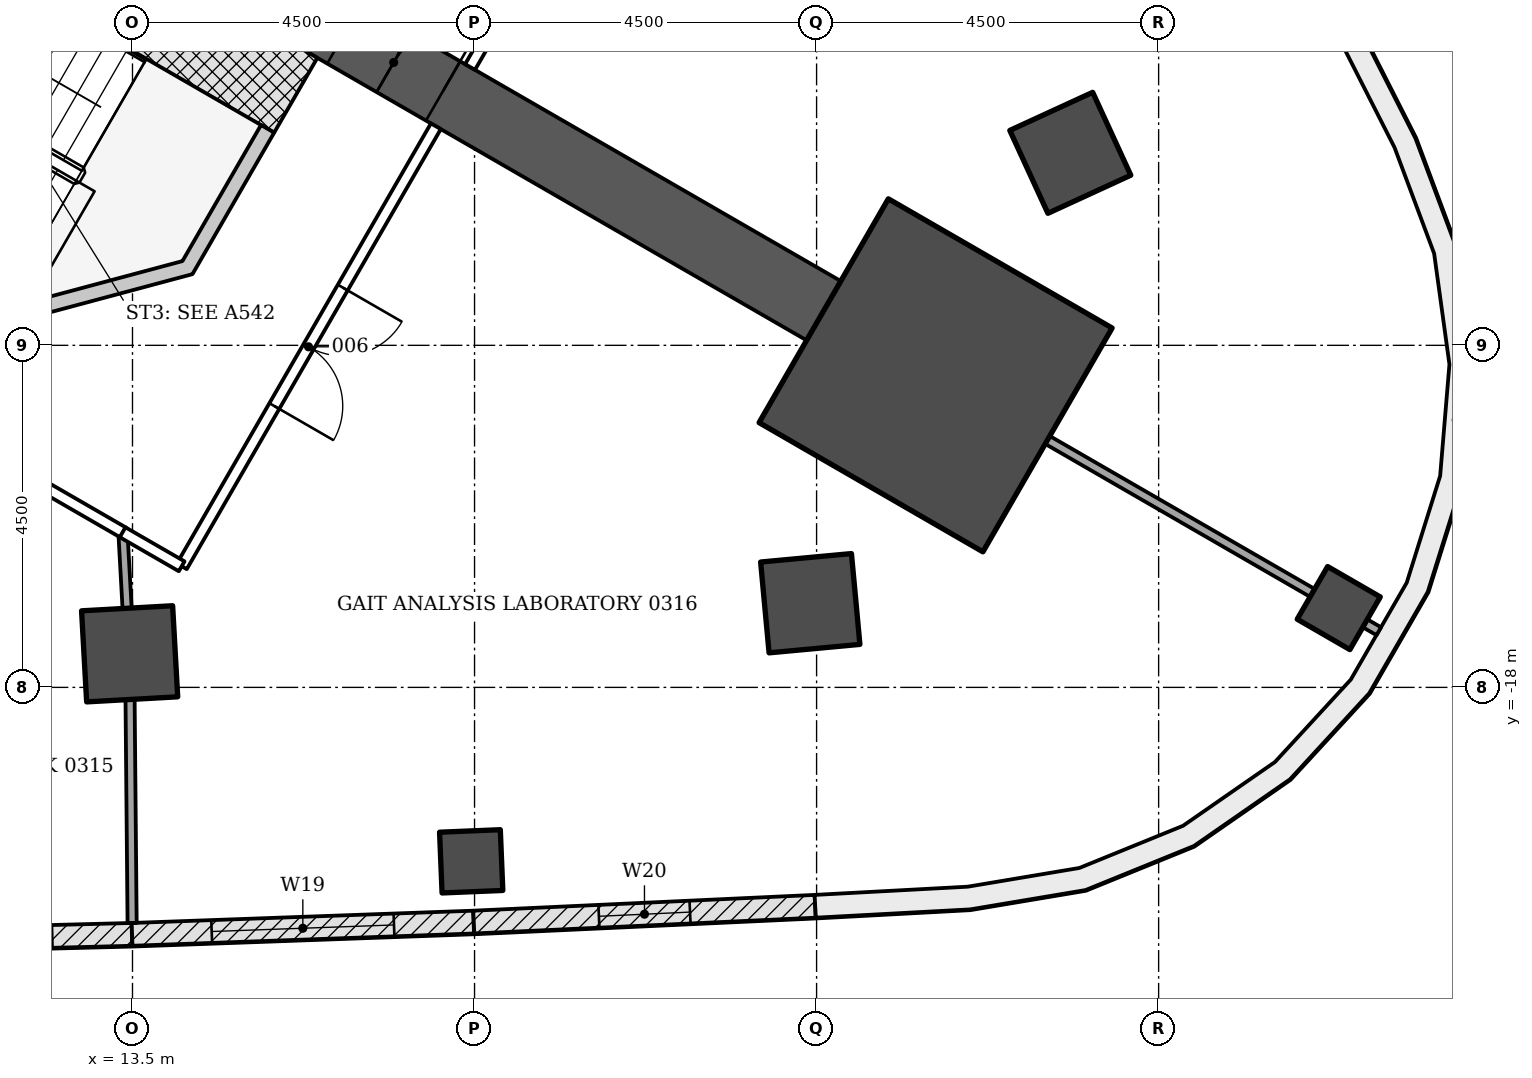
"""IFC4 building model, lengths in metres.
Left out: names, types, materials, properties, quantities, classifications, styles, units other than length and angle.
Written with IfcOpenShell. Run it as: python <this file> out.ifc"""

import sys

from ifc_helpers import new_model, si_unit, direction, frame, frame_2d, origin, origin_2d, place, context, subcontext, project, spatial, polyline, rectangle, outline, extrude, element, fill, save


model = new_model("IFC4")
c1 = context("Model", 3, precision=1e-05, world=origin(), true_north=direction((0.0, 1.0)))
c2 = subcontext(c1, "Body", "Model", "MODEL_VIEW")
j1 = project(units=[si_unit("LENGTHUNIT", "METRE"), si_unit("PLANEANGLEUNIT", "RADIAN")], contexts=[c1])
p1 = place(None, origin())
s1 = spatial("IfcSite", under=j1, at=p1, CompositionType="ELEMENT")
p2 = place(p1, origin())
s2 = spatial("IfcBuilding", under=s1, at=p2, CompositionType="ELEMENT")
p3 = place(p2, frame((0.0, 0.0, 15.0)))
s3 = spatial("IfcBuildingStorey", under=s2, at=p3, CompositionType="ELEMENT", Elevation=15.0)
for number, where, z_axis, x_axis in (
    (1, (13.462, -17.558, -0.25), (0.0, 0.0, 1.0), (0.056, -0.998, 0.0)),
    (2, (22.417, -16.893, -0.25), (0.0, 0.0, 1.0), (0.093, -0.996, 0.0)),
    (3, (25.838, -10.967, -0.25), (0.0, 0.0, 1.0), (0.909, 0.418, 0.0)),
):
    element("IfcColumn", number, at=place(p3, frame(where, z_axis=z_axis, x_axis=x_axis)), inside=s3, PredefinedType="COLUMN", context=c2, shape_type="SweptSolid", body=[
        extrude(rectangle(XDim=1.2, YDim=1.2, at=origin_2d()), origin(), (0.0, 0.0, 1.0), 4.5),
    ])
for number, where, z_axis, x_axis in (
    (4, (17.956, -20.288, -0.25), (0.0, 0.0, 1.0), (0.041, -0.999, 0.0)),
    (5, (29.37, -16.957, -0.25), (0.0, 0.0, 1.0), (0.866, -0.5, 0.0)),
):
    element("IfcColumn", number, at=place(p3, frame(where, z_axis=z_axis, x_axis=x_axis)), inside=s3, PredefinedType="COLUMN", context=c2, shape_type="SweptSolid", body=[
        extrude(rectangle(XDim=0.8, YDim=0.8, at=origin_2d()), origin(), (0.0, 0.0, 1.0), 4.5),
    ])
p4 = place(p3, frame((9.922, -5.728, -0.25), z_axis=(0.0, 0.0, 1.0), x_axis=(0.866028046028, -0.499995423472, 0.0)))
e6 = element("IfcWall", 6, at=p4, inside=s3, PredefinedType="SHEAR", context=c2, shape_type="SweptSolid", body=[
    extrude(rectangle(XDim=14.633, YDim=0.9, at=frame_2d((7.316, 0.0))), origin(), (0.0, 0.0, 1.0), 4.5),
])
p5 = place(p4, frame((7.35, 0.0, 0.25)))
e7 = element("IfcOpeningElement", 7, at=p5, cuts=e6, PredefinedType="OPENING", context=c2, shape_type="SweptSolid", body=[
    extrude(rectangle(XDim=1.5, YDim=2.1, at=frame_2d((0.75, 1.05))), frame((0.0, 0.46, 0.0), z_axis=(0.0, -1.0, 0.0), x_axis=(1.0, 0.0, 0.0)), (0.0, 0.0, 1.0), 0.92),
])
p6 = place(p3, frame((24.066, -13.895, -0.25), z_axis=(0.0, 0.0, 1.0), x_axis=(0.866025403784, -0.5, 0.0)))
e8 = element("IfcColumn", 8, at=p6, inside=s3, PredefinedType="COLUMN", context=c2, shape_type="SweptSolid", body=[
    extrude(rectangle(XDim=3.4, YDim=3.4, at=origin_2d()), origin(), (0.0, 0.0, 1.0), 4.5),
])
p7 = place(p3, frame((13.492, -21.25, 0.0), z_axis=(0.0, 0.0, 1.0), x_axis=(-0.999671466587, -0.025631209312, 0.0)))
e9 = element("IfcWall", 9, at=p7, inside=s3, PredefinedType="NOTDEFINED", context=c2, shape_type="SweptSolid", body=[
    extrude(rectangle(XDim=4.496, YDim=0.3, at=frame_2d((2.248, 0.0))), origin(), (0.0, 0.0, 1.0), 4.25),
])
p8 = place(p7, frame((1.048, 0.0, 0.9)))
e10 = element("IfcOpeningElement", 10, at=p8, cuts=e9, PredefinedType="OPENING", context=c2, shape_type="SweptSolid", body=[
    extrude(rectangle(XDim=2.4, YDim=2.4, at=frame_2d((1.2, 1.2))), frame((0.0, 0.16, 0.0), z_axis=(0.0, -1.0, 0.0), x_axis=(1.0, 0.0, 0.0)), (0.0, 0.0, 1.0), 0.32),
])
p9 = place(p3, frame((17.988, -21.088, 0.0), z_axis=(0.0, 0.0, 1.0), x_axis=(-0.999355640029, -0.035892962294, 0.0)))
e11 = element("IfcWall", 11, at=p9, inside=s3, PredefinedType="NOTDEFINED", context=c2, shape_type="SweptSolid", body=[
    extrude(rectangle(XDim=4.496, YDim=0.3, at=frame_2d((2.248, 0.0))), origin(), (0.0, 0.0, 1.0), 4.25),
])
p10 = place(p9, frame((1.048, 0.0, 0.9)))
e12 = element("IfcOpeningElement", 12, at=p10, cuts=e11, PredefinedType="OPENING", context=c2, shape_type="SweptSolid", body=[
    extrude(rectangle(XDim=2.4, YDim=2.4, at=frame_2d((1.2, 1.2))), frame((0.0, 0.16, 0.0), z_axis=(0.0, -1.0, 0.0), x_axis=(1.0, 0.0, 0.0)), (0.0, 0.0, 1.0), 0.32),
])
p11 = place(p3, frame((22.481, -20.88, 0.0), z_axis=(0.0, 0.0, 1.0), x_axis=(-0.998931717866, -0.046210637742, 0.0)))
e13 = element("IfcWall", 13, at=p11, inside=s3, PredefinedType="NOTDEFINED", context=c2, shape_type="SweptSolid", body=[
    extrude(rectangle(XDim=4.496, YDim=0.3, at=frame_2d((2.248, 0.0))), origin(), (0.0, 0.0, 1.0), 4.25),
])
p12 = place(p11, frame((1.648, 0.0, 0.8)))
e14 = element("IfcOpeningElement", 14, at=p12, cuts=e13, PredefinedType="OPENING", context=c2, shape_type="SweptSolid", body=[
    extrude(rectangle(XDim=1.2, YDim=3.0, at=frame_2d((0.6, 1.5))), frame((0.0, 0.16, 0.0), z_axis=(0.0, -1.0, 0.0), x_axis=(1.0, 0.0, 0.0)), (0.0, 0.0, 1.0), 0.32),
])
p13 = place(p3, origin())
e15 = element("IfcWall", 15, at=p13, inside=s3, PredefinedType="NOTDEFINED", context=c2, shape_type="SweptSolid", body=[
    extrude(outline(polyline([(22.49, -21.03), (24.522, -20.921), (26.04, -20.666), (27.465, -20.086), (28.729, -19.209), (29.771, -18.077), (30.54, -16.744), (31.0, -15.276), (31.128, -13.742), (30.917, -12.218), (30.379, -10.776), (29.457, -8.962), (29.19, -9.098), (30.104, -10.897), (30.625, -12.292), (30.826, -13.75), (30.704, -15.218), (30.264, -16.623), (29.528, -17.898), (28.531, -18.981), (27.321, -19.821), (25.957, -20.376), (24.489, -20.622), (22.474, -20.73), (22.49, -21.03)])), origin(), (0.0, 0.0, 1.0), 4.25),
])
p14 = place(p3, frame((9.413, -6.61, -0.25), z_axis=(0.0, 0.0, 1.0), x_axis=(0.866018442252, -0.500012057535, 0.0)))
e16 = element("IfcWall", 16, at=p14, inside=s3, PredefinedType="SHEAR", context=c2, shape_type="SweptSolid", body=[
    extrude(rectangle(XDim=7.2, YDim=1.136, at=frame_2d((3.6, 0.0))), origin(), (0.0, 0.0, 1.0), 4.5),
])
p15 = place(p3, frame((0.0, 0.0, -0.25)))
e17 = element("IfcWall", 17, at=p15, inside=s3, PredefinedType="SHEAR", context=c2, shape_type="SweptSolid", body=[
    extrude(outline(polyline([(12.104, -13.149), (14.289, -12.563), (15.364, -10.701), (15.191, -10.601), (14.157, -12.392), (12.132, -12.934), (12.204, -12.976), (12.204, -12.976), (12.204, -12.976), (12.204, -12.976), (12.204, -12.976), (12.204, -12.976), (12.204, -12.976), (12.204, -12.976), (12.204, -12.976), (12.204, -12.976), (12.204, -12.976), (12.204, -12.976), (12.204, -12.976), (12.204, -12.976), (12.204, -12.976), (12.204, -12.976), (12.204, -12.976), (12.104, -13.149)])), origin(), (0.0, 0.0, 1.0), 4.5),
])
p16 = place(p3, frame((13.429, -16.959, 0.0), z_axis=(0.0, 0.0, 1.0), x_axis=(-0.055063393043, 0.998482860517, 0.0)))
e18 = element("IfcWall", 18, at=p16, inside=s3, PredefinedType="PARTITIONING", context=c2, shape_type="SweptSolid", body=[
    extrude(rectangle(XDim=0.998, YDim=0.12, at=frame_2d((0.499, 0.0))), origin(), (0.0, 0.0, 1.0), 3.638),
])
p17 = place(p3, frame((13.495, -21.099, 0.0), z_axis=(0.0, 0.0, 1.0), x_axis=(-0.009216581037, 0.999957526415, 0.0)))
e19 = element("IfcWall", 19, at=p17, inside=s3, PredefinedType="PARTITIONING", context=c2, shape_type="SweptSolid", body=[
    extrude(rectangle(XDim=2.94, YDim=0.12, at=frame_2d((1.47, 0.0))), origin(), (0.0, 0.0, 1.0), 3.633),
])
p18 = place(p3, frame((13.377, -15.962, 0.0), z_axis=(0.0, 0.0, 1.0), x_axis=(-0.866049926484, 0.499957523033, 0.0)))
e20 = element("IfcWall", 20, at=p18, inside=s3, PredefinedType="PARTITIONING", context=c2, shape_type="SweptSolid", body=[
    extrude(rectangle(XDim=5.274, YDim=0.15, at=frame_2d((2.637, 0.0))), origin(), (0.0, 0.0, 1.0), 3.638),
])
p19 = place(p18, frame((2.15, 0.0, 0.0)))
e21 = element("IfcOpeningElement", 21, at=p19, cuts=e20, PredefinedType="OPENING", context=c2, shape_type="SweptSolid", body=[
    extrude(rectangle(XDim=1.0, YDim=2.1, at=frame_2d((0.5, 1.05))), frame((0.0, 0.085, 0.0), z_axis=(0.0, -1.0, 0.0), x_axis=(1.0, 0.0, 0.0)), (0.0, 0.0, 1.0), 0.17),
])
p20 = place(p3, frame((17.491, -10.618, 0.0), z_axis=(0.0, 0.0, 1.0), x_axis=(-0.499969057507, -0.866043267704, 0.0)))
e22 = element("IfcWall", 22, at=p20, inside=s3, PredefinedType="PARTITIONING", context=c2, shape_type="SweptSolid", body=[
    extrude(rectangle(XDim=6.685, YDim=0.15, at=frame_2d((3.342, 0.0))), origin(), (0.0, 0.0, 1.0), 3.638),
])
p21 = place(p20, frame((2.45, 0.0, 0.0)))
e23 = element("IfcOpeningElement", 23, at=p21, cuts=e22, PredefinedType="OPENING", context=c2, shape_type="SweptSolid", body=[
    extrude(rectangle(XDim=1.8, YDim=2.1, at=frame_2d((0.9, 1.05))), frame((0.0, 0.085, 0.0), z_axis=(0.0, -1.0, 0.0), x_axis=(1.0, 0.0, 0.0)), (0.0, 0.0, 1.0), 0.17),
])
p22 = place(p3, frame((14.147, -16.407, 0.0), z_axis=(0.0, 0.0, 1.0), x_axis=(-0.866276218641, 0.499565324075, 0.0)))
e24 = element("IfcWall", 24, at=p22, inside=s3, PredefinedType="PARTITIONING", context=c2, shape_type="SweptSolid", body=[
    extrude(rectangle(XDim=0.897, YDim=0.15, at=frame_2d((0.448, 0.0))), origin(), (0.0, 0.0, 1.0), 3.638),
])
p23 = place(p3, frame((29.023, -16.757, 0.0), z_axis=(0.0, 0.0, 1.0), x_axis=(-0.866027971625, 0.499995552344, 0.0)))
e25 = element("IfcWall", 25, at=p23, inside=s3, PredefinedType="PARTITIONING", context=c2, shape_type="SweptSolid", body=[
    extrude(rectangle(XDim=4.024, YDim=0.12, at=frame_2d((2.012, 0.0))), origin(), (0.0, 0.0, 1.0), 3.717),
])
p24 = place(p3, frame((29.896, -17.261, 0.0), z_axis=(0.0, 0.0, 1.0), x_axis=(-0.865774595023, 0.500434162116, 0.0)))
e26 = element("IfcWall", 26, at=p24, inside=s3, PredefinedType="PARTITIONING", context=c2, shape_type="SweptSolid", body=[
    extrude(rectangle(XDim=0.208, YDim=0.12, at=frame_2d((0.104, 0.0))), origin(), (0.0, 0.0, 1.0), 4.25),
])
p25 = place(p3, frame((18.84, -8.281, 0.0), z_axis=(0.0, 0.0, 1.0), x_axis=(-0.500126010714, -0.86595263924, 0.0)))
e27 = element("IfcWall", 27, at=p25, inside=s3, PredefinedType="PARTITIONING", context=c2, shape_type="SweptSolid", body=[
    extrude(rectangle(XDim=1.798, YDim=0.15, at=frame_2d((0.899, 0.0))), origin(), (0.0, 0.0, 1.0), 3.638),
])
p26 = place(p8, origin())
e28 = element("IfcWindow", 28, at=p26, inside=s3, PartitioningType="DOUBLE_PANEL_VERTICAL", PredefinedType="WINDOW", context=c2, shape_type="SweptSolid", body=[
    extrude(rectangle(XDim=2.4, YDim=2.4, at=frame_2d((1.2, 1.2))), frame((0.0, 0.03, 0.0), z_axis=(0.0, -1.0, 0.0), x_axis=(1.0, 0.0, 0.0)), (0.0, 0.0, 1.0), 0.06),
])
fill(e10, e28)
p27 = place(p10, origin())
e29 = element("IfcWindow", 29, at=p27, inside=s3, PartitioningType="DOUBLE_PANEL_VERTICAL", PredefinedType="WINDOW", context=c2, shape_type="SweptSolid", body=[
    extrude(rectangle(XDim=2.4, YDim=2.4, at=frame_2d((1.2, 1.2))), frame((0.0, 0.03, 0.0), z_axis=(0.0, -1.0, 0.0), x_axis=(1.0, 0.0, 0.0)), (0.0, 0.0, 1.0), 0.06),
])
fill(e12, e29)
p28 = place(p12, origin())
e30 = element("IfcWindow", 30, at=p28, inside=s3, PartitioningType="SINGLE_PANEL", PredefinedType="WINDOW", context=c2, shape_type="SweptSolid", body=[
    extrude(rectangle(XDim=1.2, YDim=3.0, at=frame_2d((0.6, 1.5))), frame((0.0, 0.03, 0.0), z_axis=(0.0, -1.0, 0.0), x_axis=(1.0, 0.0, 0.0)), (0.0, 0.0, 1.0), 0.06),
])
fill(e14, e30)
p29 = place(p21, origin())
e31 = element("IfcDoor", 31, at=p29, inside=s3, OperationType="DOUBLE_DOOR_SINGLE_SWING", PredefinedType="DOOR", context=c2, shape_type="SweptSolid", body=[
    extrude(rectangle(XDim=1.8, YDim=2.1, at=frame_2d((0.9, 1.05))), frame((0.0, 0.025, 0.0), z_axis=(0.0, -1.0, 0.0), x_axis=(1.0, 0.0, 0.0)), (0.0, 0.0, 1.0), 0.05),
])
fill(e23, e31)
p30 = place(p5, origin())
e32 = element("IfcDoor", 32, at=p30, inside=s3, OperationType="DOUBLE_DOOR_SINGLE_SWING", PredefinedType="DOOR", context=c2, shape_type="SweptSolid", body=[
    extrude(rectangle(XDim=1.5, YDim=2.1, at=frame_2d((0.75, 1.05))), frame((0.0, 0.025, 0.0), z_axis=(0.0, -1.0, 0.0), x_axis=(1.0, 0.0, 0.0)), (0.0, 0.0, 1.0), 0.05),
])
fill(e7, e32)
save(model, sys.argv[1])
